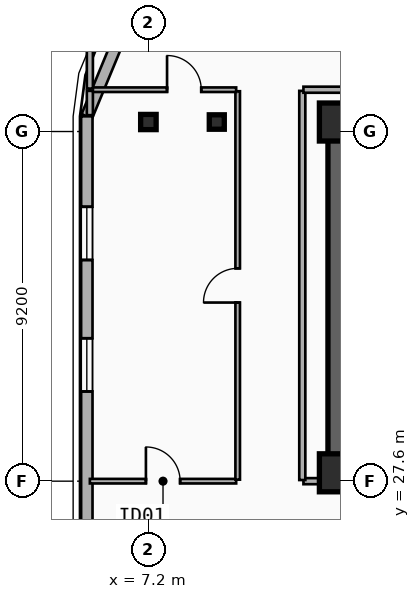
"""IFC4 building model, lengths in metres.
Left out: names, types, materials, properties, quantities, classifications, styles, units other than length and angle.
Written with IfcOpenShell. Run it as: python <this file> out.ifc"""

import sys

from ifc_helpers import new_model, si_unit, direction, frame, frame_2d, origin, origin_2d, place, context, subcontext, project, spatial, rectangle, i_section, extrude, element, fill, save


model = new_model("IFC4")
c1 = context("Model", 3, precision=1e-05, world=origin(), true_north=direction((0.0, 1.0)))
c2 = subcontext(c1, "Body", "Model", "MODEL_VIEW")
j1 = project(units=[si_unit("LENGTHUNIT", "METRE"), si_unit("PLANEANGLEUNIT", "RADIAN")], contexts=[c1])
p1 = place(None, origin())
s1 = spatial("IfcSite", under=j1, at=p1, CompositionType="ELEMENT")
p2 = place(p1, origin())
s2 = spatial("IfcBuilding", under=s1, at=p2, CompositionType="ELEMENT")
p3 = place(p2, frame((0.0, 0.0, 232.8)))
s3 = spatial("IfcBuildingStorey", under=s2, at=p3, CompositionType="ELEMENT", Elevation=232.8)
p4 = place(p3, frame((12.15, 37.05, 0.0), z_axis=(0.0, 0.0, 1.0), x_axis=(1.0, 0.0, 0.0)))
e1 = element("IfcWall", 1, at=p4, inside=s3, PredefinedType="SHEAR", context=c2, shape_type="SweptSolid", body=[
    extrude(rectangle(XDim=33.23, YDim=0.45, at=frame_2d((16.615, 0.0))), origin(), (0.0, 0.0, 1.0), 3.6),
])
p5 = place(p3, frame((21.18, 27.82, 0.0), z_axis=(0.0, 0.0, 1.0), x_axis=(-1.0, 0.0, 0.0)))
e2 = element("IfcWall", 2, at=p5, inside=s3, PredefinedType="SHEAR", context=c2, shape_type="SweptSolid", body=[
    extrude(rectangle(XDim=9.03, YDim=0.45, at=frame_2d((4.515, 0.0))), origin(), (0.0, 0.0, 1.0), 3.6),
])
p6 = place(p5, frame((2.68, 0.0, 0.0)))
e3 = element("IfcOpeningElement", 3, at=p6, cuts=e2, PredefinedType="OPENING", context=c2, shape_type="SweptSolid", body=[
    extrude(rectangle(XDim=1.1, YDim=2.15, at=frame_2d((0.55, 1.075))), frame((0.0, 0.235, 0.0), z_axis=(0.0, -1.0, 0.0), x_axis=(1.0, 0.0, 0.0)), (0.0, 0.0, 1.0), 0.47),
])
p7 = place(p3, frame((12.15, 28.045, 0.0), z_axis=(0.0, 0.0, 1.0), x_axis=(0.0, 1.0, 0.0)))
e4 = element("IfcWall", 4, at=p7, inside=s3, PredefinedType="SHEAR", context=c2, shape_type="SweptSolid", body=[
    extrude(rectangle(XDim=8.78, YDim=0.45, at=frame_2d((4.39, 0.0))), origin(), (0.0, 0.0, 1.0), 3.6),
])
for number, where, z_axis, x_axis in (
    (5, (12.2, 27.82, 0.0), (0.0, 0.0, 1.0), (1.0, 0.0, 0.0)),
    (6, (12.2, 37.05, 0.0), (0.0, 0.0, 1.0), (1.0, 0.0, 0.0)),
):
    element("IfcColumn", number, at=place(p3, frame(where, z_axis=z_axis, x_axis=x_axis)), inside=s3, PredefinedType="COLUMN", context=c2, shape_type="SweptSolid", body=[
        extrude(rectangle(XDim=1.0, YDim=1.0, at=origin_2d()), origin(), (0.0, 0.0, 1.0), 3.6),
    ])
p8 = place(p3, frame((9.0, 37.05, 0.0), z_axis=(0.0, 0.0, 1.0), x_axis=(1.0, 0.0, 0.0)))
e7 = element("IfcColumn", 7, at=p8, inside=s3, PredefinedType="COLUMN", context=c2, shape_type="SweptSolid", body=[
    extrude(i_section(OverallWidth=0.395, OverallDepth=0.38, WebThickness=0.019, FlangeThickness=0.03, FilletRadius=0.015, at=origin_2d()), origin(), (0.0, 0.0, 1.0), 3.6),
])
p9 = place(p3, frame((7.2, 37.05, 0.0), z_axis=(0.0, 0.0, 1.0), x_axis=(1.0, 0.0, 0.0)))
e8 = element("IfcColumn", 8, at=p9, inside=s3, PredefinedType="COLUMN", context=c2, shape_type="SweptSolid", body=[
    extrude(i_section(OverallWidth=0.408, OverallDepth=0.4, WebThickness=0.025, FlangeThickness=0.039, FilletRadius=0.015, at=origin_2d()), origin(), (0.0, 0.0, 1.0), 3.6),
])
p10 = place(p3, frame((5.58, 37.2, 0.0), z_axis=(0.0, 0.0, 1.0), x_axis=(0.382636798336, 0.92389884758, 0.0)))
e9 = element("IfcWall", 9, at=p10, inside=s3, PredefinedType="SOLIDWALL", context=c2, shape_type="SweptSolid", body=[
    extrude(rectangle(XDim=3.077, YDim=0.3, at=frame_2d((1.538, 0.0))), origin(), (0.0, 0.0, 1.0), 3.34),
])
p11 = place(p3, frame((5.58, 8.6, 0.0), z_axis=(0.0, 0.0, 1.0), x_axis=(0.0, 1.0, 0.0)))
e10 = element("IfcWall", 10, at=p11, inside=s3, PredefinedType="SOLIDWALL", context=c2, shape_type="SweptSolid", body=[
    extrude(rectangle(XDim=28.6, YDim=0.3, at=frame_2d((14.3, 0.0))), origin(), (0.0, 0.0, 1.0), 3.34),
])
p12 = place(p11, frame((21.36, 0.0, 0.34)))
e11 = element("IfcOpeningElement", 11, at=p12, cuts=e10, PredefinedType="OPENING", context=c2, shape_type="SweptSolid", body=[
    extrude(rectangle(XDim=1.4, YDim=2.1, at=frame_2d((0.7, 1.05))), frame((0.0, 0.16, 0.0), z_axis=(0.0, -1.0, 0.0), x_axis=(1.0, 0.0, 0.0)), (0.0, 0.0, 1.0), 0.32),
])
p13 = place(p11, frame((24.82, 0.0, 0.34)))
e12 = element("IfcOpeningElement", 12, at=p13, cuts=e10, PredefinedType="OPENING", context=c2, shape_type="SweptSolid", body=[
    extrude(rectangle(XDim=1.4, YDim=2.1, at=frame_2d((0.7, 1.05))), frame((0.0, 0.16, 0.0), z_axis=(0.0, -1.0, 0.0), x_axis=(1.0, 0.0, 0.0)), (0.0, 0.0, 1.0), 0.32),
])
p14 = place(p11, frame((4.797, 0.0, 0.34)))
e13 = element("IfcOpeningElement", 13, at=p14, cuts=e10, PredefinedType="OPENING", context=c2, shape_type="SweptSolid", body=[
    extrude(rectangle(XDim=1.4, YDim=2.1, at=frame_2d((0.7, 1.05))), frame((0.0, 0.16, 0.0), z_axis=(0.0, -1.0, 0.0), x_axis=(1.0, 0.0, 0.0)), (0.0, 0.0, 1.0), 0.32),
])
p15 = place(p11, frame((10.673, 0.0, 0.34)))
e14 = element("IfcOpeningElement", 14, at=p15, cuts=e10, PredefinedType="OPENING", context=c2, shape_type="SweptSolid", body=[
    extrude(rectangle(XDim=1.4, YDim=2.1, at=frame_2d((0.7, 1.05))), frame((0.0, 0.16, 0.0), z_axis=(0.0, -1.0, 0.0), x_axis=(1.0, 0.0, 0.0)), (0.0, 0.0, 1.0), 0.32),
])
p16 = place(p3, frame((5.66, 27.6, 0.0), z_axis=(0.0, 0.0, 1.0), x_axis=(1.0, 0.0, 0.0)))
e15 = element("IfcWall", 15, at=p16, inside=s3, PredefinedType="PARTITIONING", context=c2, shape_type="SweptSolid", body=[
    extrude(rectangle(XDim=3.85, YDim=0.12, at=frame_2d((1.925, 0.0))), origin(), (0.0, 0.0, 1.0), 2.67),
])
p17 = place(p16, frame((1.475, 0.0, 0.0)))
e16 = element("IfcOpeningElement", 16, at=p17, cuts=e15, PredefinedType="OPENING", context=c2, shape_type="SweptSolid", body=[
    extrude(rectangle(XDim=0.9, YDim=2.1, at=frame_2d((0.45, 1.05))), frame((0.0, 0.07, 0.0), z_axis=(0.0, -1.0, 0.0), x_axis=(1.0, 0.0, 0.0)), (0.0, 0.0, 1.0), 0.14),
])
p18 = place(p3, frame((9.55, 27.64, 0.0), z_axis=(0.0, 0.0, 1.0), x_axis=(0.0, 1.0, 0.0)))
e17 = element("IfcWall", 17, at=p18, inside=s3, PredefinedType="PARTITIONING", context=c2, shape_type="SweptSolid", body=[
    extrude(rectangle(XDim=10.22, YDim=0.12, at=frame_2d((5.11, 0.0))), origin(), (0.0, 0.0, 1.0), 2.82),
])
p19 = place(p18, frame((4.66, 0.0, 0.0)))
e18 = element("IfcOpeningElement", 18, at=p19, cuts=e17, PredefinedType="OPENING", context=c2, shape_type="SweptSolid", body=[
    extrude(rectangle(XDim=0.9, YDim=2.1, at=frame_2d((0.45, 1.05))), frame((0.0, 0.07, 0.0), z_axis=(0.0, -1.0, 0.0), x_axis=(1.0, 0.0, 0.0)), (0.0, 0.0, 1.0), 0.14),
])
p20 = place(p3, frame((5.66, 37.9, 0.0), z_axis=(0.0, 0.0, 1.0), x_axis=(1.0, 0.0, 0.0)))
e19 = element("IfcWall", 19, at=p20, inside=s3, PredefinedType="PARTITIONING", context=c2, shape_type="SweptSolid", body=[
    extrude(rectangle(XDim=3.85, YDim=0.12, at=frame_2d((1.925, 0.0))), origin(), (0.0, 0.0, 1.0), 3.34),
])
p21 = place(p20, frame((2.031, 0.0, 0.0)))
e20 = element("IfcOpeningElement", 20, at=p21, cuts=e19, PredefinedType="OPENING", context=c2, shape_type="SweptSolid", body=[
    extrude(rectangle(XDim=0.9, YDim=2.1, at=frame_2d((0.45, 1.05))), frame((0.0, 0.07, 0.0), z_axis=(0.0, -1.0, 0.0), x_axis=(1.0, 0.0, 0.0)), (0.0, 0.0, 1.0), 0.14),
])
p22 = place(p3, frame((11.28, 27.6, 0.0), z_axis=(0.0, 0.0, 1.0), x_axis=(1.0, 0.0, 0.0)))
e21 = element("IfcWall", 21, at=p22, inside=s3, PredefinedType="PARTITIONING", context=c2, shape_type="SweptSolid", body=[
    extrude(rectangle(XDim=0.84, YDim=0.16, at=frame_2d((0.42, 0.0))), origin(), (0.0, 0.0, 1.0), 2.41),
])
p23 = place(p3, frame((11.25, 27.63, 0.0), z_axis=(0.0, 0.0, 1.0), x_axis=(0.0, 1.0, 0.0)))
e22 = element("IfcWall", 22, at=p23, inside=s3, PredefinedType="PARTITIONING", context=c2, shape_type="SweptSolid", body=[
    extrude(rectangle(XDim=10.24, YDim=0.16, at=frame_2d((5.12, 0.0))), origin(), (0.0, 0.0, 1.0), 2.82),
])
p24 = place(p3, frame((11.28, 37.9, 0.0), z_axis=(0.0, 0.0, 1.0), x_axis=(1.0, 0.0, 0.0)))
e23 = element("IfcWall", 23, at=p24, inside=s3, PredefinedType="PARTITIONING", context=c2, shape_type="SweptSolid", body=[
    extrude(rectangle(XDim=35.04, YDim=0.16, at=frame_2d((17.52, 0.0))), origin(), (0.0, 0.0, 1.0), 3.34),
])
p25 = place(p3, frame((5.66, 37.93, 0.0), z_axis=(0.0, 0.0, 1.0), x_axis=(0.0, 1.0, 0.0)))
e24 = element("IfcWall", 24, at=p25, inside=s3, PredefinedType="PARTITIONING", context=c2, shape_type="SweptSolid", body=[
    extrude(rectangle(XDim=1.44, YDim=0.16, at=frame_2d((0.72, 0.0))), origin(), (0.0, 0.0, 1.0), 3.34),
])
p26 = place(p3, frame((5.66, 37.23, 0.0), z_axis=(0.0, 0.0, 1.0), x_axis=(0.0, 1.0, 0.0)))
e25 = element("IfcWall", 25, at=p26, inside=s3, PredefinedType="PARTITIONING", context=c2, shape_type="SweptSolid", body=[
    extrude(rectangle(XDim=0.64, YDim=0.16, at=frame_2d((0.32, 0.0))), origin(), (0.0, 0.0, 1.0), 3.34),
])
p27 = place(p12, origin())
e26 = element("IfcWindow", 26, at=p27, inside=s3, PartitioningType="SINGLE_PANEL", PredefinedType="WINDOW", context=c2, shape_type="SweptSolid", body=[
    extrude(rectangle(XDim=1.4, YDim=2.1, at=frame_2d((0.7, 1.05))), frame((0.0, 0.03, 0.0), z_axis=(0.0, -1.0, 0.0), x_axis=(1.0, 0.0, 0.0)), (0.0, 0.0, 1.0), 0.06),
])
fill(e11, e26)
p28 = place(p13, origin())
e27 = element("IfcWindow", 27, at=p28, inside=s3, PartitioningType="SINGLE_PANEL", PredefinedType="WINDOW", context=c2, shape_type="SweptSolid", body=[
    extrude(rectangle(XDim=1.4, YDim=2.1, at=frame_2d((0.7, 1.05))), frame((0.0, 0.03, 0.0), z_axis=(0.0, -1.0, 0.0), x_axis=(1.0, 0.0, 0.0)), (0.0, 0.0, 1.0), 0.06),
])
fill(e12, e27)
p29 = place(p17, origin())
e28 = element("IfcDoor", 28, at=p29, inside=s3, OperationType="SINGLE_SWING_LEFT", PredefinedType="DOOR", context=c2, shape_type="SweptSolid", body=[
    extrude(rectangle(XDim=0.9, YDim=2.1, at=frame_2d((0.45, 1.05))), frame((0.0, 0.025, 0.0), z_axis=(0.0, -1.0, 0.0), x_axis=(1.0, 0.0, 0.0)), (0.0, 0.0, 1.0), 0.05),
])
fill(e16, e28)
p30 = place(p19, origin())
e29 = element("IfcDoor", 29, at=p30, inside=s3, OperationType="SINGLE_SWING_LEFT", PredefinedType="DOOR", context=c2, shape_type="SweptSolid", body=[
    extrude(rectangle(XDim=0.9, YDim=2.1, at=frame_2d((0.45, 1.05))), frame((0.0, 0.025, 0.0), z_axis=(0.0, -1.0, 0.0), x_axis=(1.0, 0.0, 0.0)), (0.0, 0.0, 1.0), 0.05),
])
fill(e18, e29)
p31 = place(p21, origin())
e30 = element("IfcDoor", 30, at=p31, inside=s3, OperationType="SINGLE_SWING_LEFT", PredefinedType="DOOR", context=c2, shape_type="SweptSolid", body=[
    extrude(rectangle(XDim=0.9, YDim=2.1, at=frame_2d((0.45, 1.05))), frame((0.0, 0.025, 0.0), z_axis=(0.0, -1.0, 0.0), x_axis=(1.0, 0.0, 0.0)), (0.0, 0.0, 1.0), 0.05),
])
fill(e20, e30)
save(model, sys.argv[1])
